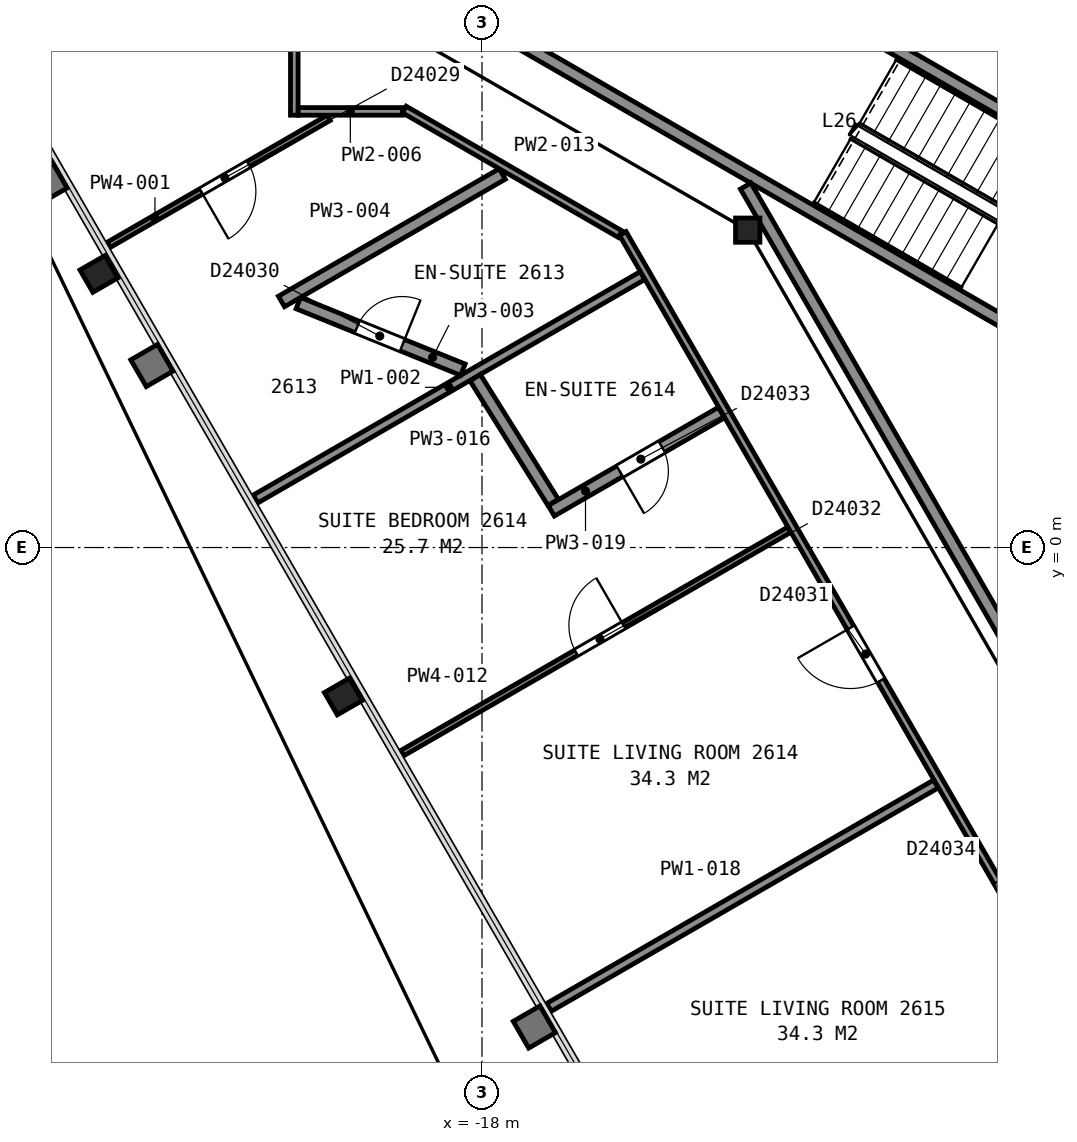
"""IFC4 building model, lengths in metres.
Left out: names, types, materials, properties, quantities, classifications, styles, units other than length and angle.
Written with IfcOpenShell. Run it as: python <this file> out.ifc"""

import sys

from ifc_helpers import new_model, si_unit, direction, frame, frame_2d, origin, origin_2d, place, context, subcontext, project, spatial, rectangle, i_section, extrude, element, fill, save


model = new_model("IFC4")
c1 = context("Model", 3, precision=1e-05, world=origin(), true_north=direction((0.0, 1.0)))
c2 = subcontext(c1, "Body", "Model", "MODEL_VIEW")
j1 = project(units=[si_unit("LENGTHUNIT", "METRE"), si_unit("PLANEANGLEUNIT", "RADIAN")], contexts=[c1])
p1 = place(None, origin())
s1 = spatial("IfcSite", under=j1, at=p1, CompositionType="ELEMENT")
p2 = place(p1, origin())
s2 = spatial("IfcBuilding", under=s1, at=p2, CompositionType="ELEMENT")
p3 = place(p2, frame((0.0, 0.0, 110.8)))
s3 = spatial("IfcBuildingStorey", under=s2, at=p3, CompositionType="ELEMENT", Elevation=110.8)
for number, where, z_axis, x_axis in (
    (1, (-24.3, 4.5, 0.0), (0.0, 0.0, 1.0), (-0.5, 0.866, 0.0)),
    (2, (-20.28, -2.45, 0.0), (0.0, 0.0, 1.0), (-0.5, 0.866, 0.0)),
):
    element("IfcColumn", number, at=place(p3, frame(where, z_axis=z_axis, x_axis=x_axis)), inside=s3, PredefinedType="COLUMN", context=c2, shape_type="SweptSolid", body=[
        extrude(i_section(OverallWidth=0.424, OverallDepth=0.475, WebThickness=0.048, FlangeThickness=0.077, FilletRadius=0.015, at=origin_2d()), origin(), (0.0, 0.0, 1.0), 3.6),
    ])
p4 = place(p3, frame((-13.63, 5.22, 0.0), z_axis=(0.0, 0.0, 1.0), x_axis=(1.0, 0.0, 0.0)))
e3 = element("IfcColumn", 3, at=p4, inside=s3, PredefinedType="COLUMN", context=c2, shape_type="SweptSolid", body=[
    extrude(i_section(OverallWidth=0.401, OverallDepth=0.399, WebThickness=0.025, FlangeThickness=0.04, FilletRadius=0.015, at=origin_2d()), origin(), (0.0, 0.0, 1.0), 3.6),
])
for number, where, z_axis, x_axis in (
    (4, (-7.678, 2.701, 0.0), (0.0, 0.0, 1.0), (-0.866, 0.5, 0.0)),
    (5, (-6.178, 5.299, 0.0), (0.0, 0.0, 1.0), (-0.866, 0.5, 0.0)),
):
    element("IfcWall", number, at=place(p3, frame(where, z_axis=z_axis, x_axis=x_axis)), inside=s3, PredefinedType="PARTITIONING", context=c2, shape_type="SweptSolid", body=[
        extrude(rectangle(XDim=12.0, YDim=0.2, at=frame_2d((6.0, 0.0))), origin(), (0.0, 0.0, 1.0), 3.35),
    ])
p5 = place(p3, frame((-13.664, 5.946, 0.0), z_axis=(0.0, 0.0, 1.0), x_axis=(0.499994327219, -0.866028678941, 0.0)))
e6 = element("IfcWall", 6, at=p5, inside=s3, PredefinedType="PARTITIONING", context=c2, shape_type="SweptSolid", body=[
    extrude(rectangle(XDim=23.968, YDim=0.2, at=frame_2d((11.984, 0.0))), origin(), (0.0, 0.0, 1.0), 3.35),
])
p6 = place(p3, frame((-20.521, 7.067, 0.0), z_axis=(0.0, 0.0, 1.0), x_axis=(-0.866025950195, -0.499999053588, 0.0)))
e7 = element("IfcWall", 7, at=p6, inside=s3, PredefinedType="PARTITIONING", context=c2, shape_type="SweptSolid", body=[
    extrude(rectangle(XDim=4.177, YDim=0.1, at=frame_2d((2.088, 0.0))), origin(), (0.0, 0.0, 1.0), 2.613),
])
p7 = place(p6, frame((1.522, 0.0, 0.0)))
e8 = element("IfcOpeningElement", 8, at=p7, cuts=e7, PredefinedType="OPENING", context=c2, shape_type="SweptSolid", body=[
    extrude(rectangle(XDim=0.9, YDim=2.1, at=frame_2d((0.45, 1.05))), frame((0.0, 0.06, 0.0), z_axis=(0.0, -1.0, 0.0), x_axis=(1.0, 0.0, 0.0)), (0.0, 0.0, 1.0), 0.12),
])
p8 = place(p3, frame((-21.725, 0.798, 0.0), z_axis=(0.0, 0.0, 1.0), x_axis=(0.866003534372, 0.50003787702, 0.0)))
e9 = element("IfcWall", 9, at=p8, inside=s3, PredefinedType="PARTITIONING", context=c2, shape_type="SweptSolid", body=[
    extrude(rectangle(XDim=7.348, YDim=0.15, at=frame_2d((3.674, 0.0))), origin(), (0.0, 0.0, 1.0), 2.613),
])
p9 = place(p3, frame((-21.021, 4.02, 0.0), z_axis=(0.0, 0.0, 1.0), x_axis=(0.927010502524, -0.375035369278, 0.0)))
e10 = element("IfcWall", 10, at=p9, inside=s3, PredefinedType="PARTITIONING", context=c2, shape_type="SweptSolid", body=[
    extrude(rectangle(XDim=2.92, YDim=0.2, at=frame_2d((1.46, 0.0))), origin(), (0.0, 0.0, 1.0), 2.613),
])
p10 = place(p9, frame((1.045, 0.0, 0.0)))
e11 = element("IfcOpeningElement", 11, at=p10, cuts=e10, PredefinedType="OPENING", context=c2, shape_type="SweptSolid", body=[
    extrude(rectangle(XDim=0.8, YDim=2.1, at=frame_2d((0.4, 1.05))), frame((0.0, 0.11, 0.0), z_axis=(0.0, -1.0, 0.0), x_axis=(1.0, 0.0, 0.0)), (0.0, 0.0, 1.0), 0.22),
])
p11 = place(p3, frame((-21.298, 4.047, 0.0), z_axis=(0.0, 0.0, 1.0), x_axis=(0.865948008923, 0.500134027879, 0.0)))
e12 = element("IfcWall", 12, at=p11, inside=s3, PredefinedType="PARTITIONING", context=c2, shape_type="SweptSolid", body=[
    extrude(rectangle(XDim=4.193, YDim=0.2, at=frame_2d((2.097, 0.0))), origin(), (0.0, 0.0, 1.0), 2.613),
])
p12 = place(p3, frame((-21.087, 7.111, 0.0), z_axis=(0.0, 0.0, 1.0), x_axis=(0.0, 1.0, 0.0)))
e13 = element("IfcWall", 13, at=p12, inside=s3, PredefinedType="PARTITIONING", context=c2, shape_type="SweptSolid", body=[
    extrude(rectangle(XDim=3.099, YDim=0.125, at=frame_2d((1.549, 0.0))), origin(), (0.0, 0.0, 1.0), 2.613),
])
p13 = place(p3, frame((-21.022, 7.173, 0.0), z_axis=(0.0, 0.0, 1.0), x_axis=(1.0, 0.0, 0.0)))
e14 = element("IfcWall", 14, at=p13, inside=s3, PredefinedType="PARTITIONING", context=c2, shape_type="SweptSolid", body=[
    extrude(rectangle(XDim=1.713, YDim=0.125, at=frame_2d((0.856, 0.0))), origin(), (0.0, 0.0, 1.0), 2.613),
])
p14 = place(p3, frame((-19.311, -3.382, 0.0), z_axis=(0.0, 0.0, 1.0), x_axis=(0.865995225926, 0.500052265941, 0.0)))
e15 = element("IfcWall", 15, at=p14, inside=s3, PredefinedType="PARTITIONING", context=c2, shape_type="SweptSolid", body=[
    extrude(rectangle(XDim=7.347, YDim=0.1, at=frame_2d((3.674, 0.0))), origin(), (0.0, 0.0, 1.0), 2.613),
])
p15 = place(p14, frame((3.303, 0.0, 0.0)))
e16 = element("IfcOpeningElement", 16, at=p15, cuts=e15, PredefinedType="OPENING", context=c2, shape_type="SweptSolid", body=[
    extrude(rectangle(XDim=0.9, YDim=2.1, at=frame_2d((0.45, 1.05))), frame((0.0, 0.06, 0.0), z_axis=(0.0, -1.0, 0.0), x_axis=(1.0, 0.0, 0.0)), (0.0, 0.0, 1.0), 0.12),
])
p16 = place(p3, frame((-19.278, 7.204, 0.0), z_axis=(0.0, 0.0, 1.0), x_axis=(0.865992261418, -0.50005739987, 0.0)))
e17 = element("IfcWall", 17, at=p16, inside=s3, PredefinedType="PARTITIONING", context=c2, shape_type="SweptSolid", body=[
    extrude(rectangle(XDim=4.101, YDim=0.125, at=frame_2d((2.051, 0.0))), origin(), (0.0, 0.0, 1.0), 2.613),
])
p17 = place(p3, frame((-18.112, 2.793, 0.0), z_axis=(0.0, 0.0, 1.0), x_axis=(0.530334606404, -0.847788420097, 0.0)))
e18 = element("IfcWall", 18, at=p17, inside=s3, PredefinedType="PARTITIONING", context=c2, shape_type="SweptSolid", body=[
    extrude(rectangle(XDim=2.419, YDim=0.2, at=frame_2d((1.209, 0.0))), origin(), (0.0, 0.0, 1.0), 2.613),
])
p18 = place(p3, frame((-16.898, -7.562, 0.0), z_axis=(0.0, 0.0, 1.0), x_axis=(0.866055004685, 0.499948726231, 0.0)))
e19 = element("IfcWall", 19, at=p18, inside=s3, PredefinedType="PARTITIONING", context=c2, shape_type="SweptSolid", body=[
    extrude(rectangle(XDim=7.347, YDim=0.15, at=frame_2d((3.674, 0.0))), origin(), (0.0, 0.0, 1.0), 2.613),
])
p19 = place(p3, frame((-16.861, 0.604, 0.0), z_axis=(0.0, 0.0, 1.0), x_axis=(0.866003189247, 0.500038474733, 0.0)))
e20 = element("IfcWall", 20, at=p19, inside=s3, PredefinedType="PARTITIONING", context=c2, shape_type="SweptSolid", body=[
    extrude(rectangle(XDim=3.232, YDim=0.2, at=frame_2d((1.616, 0.0))), origin(), (0.0, 0.0, 1.0), 2.613),
])
p20 = place(p19, frame((1.3, 0.0, 0.0)))
e21 = element("IfcOpeningElement", 21, at=p20, cuts=e20, PredefinedType="OPENING", context=c2, shape_type="SweptSolid", body=[
    extrude(rectangle(XDim=0.8, YDim=2.1, at=frame_2d((0.4, 1.05))), frame((0.0, 0.11, 0.0), z_axis=(0.0, -1.0, 0.0), x_axis=(1.0, 0.0, 0.0)), (0.0, 0.0, 1.0), 0.22),
])
p21 = place(p3, frame((-3.756, -15.494, 0.0), z_axis=(0.0, 0.0, 1.0), x_axis=(-0.500027787016, 0.866009360349, 0.0)))
e22 = element("IfcWall", 22, at=p21, inside=s3, PredefinedType="PARTITIONING", context=c2, shape_type="SweptSolid", body=[
    extrude(rectangle(XDim=23.856, YDim=0.125, at=frame_2d((11.928, 0.0))), origin(), (0.0, 0.0, 1.0), 2.613),
])
p22 = place(p21, frame((15.368, 0.0, 0.0)))
e23 = element("IfcOpeningElement", 23, at=p22, cuts=e22, PredefinedType="OPENING", context=c2, shape_type="SweptSolid", body=[
    extrude(rectangle(XDim=1.0, YDim=2.1, at=frame_2d((0.5, 1.05))), frame((0.0, 0.073, 0.0), z_axis=(0.0, -1.0, 0.0), x_axis=(1.0, 0.0, 0.0)), (0.0, 0.0, 1.0), 0.145),
])
p23 = place(p21, frame((10.54, 0.0, 0.0)))
e24 = element("IfcOpeningElement", 24, at=p23, cuts=e22, PredefinedType="OPENING", context=c2, shape_type="SweptSolid", body=[
    extrude(rectangle(XDim=1.0, YDim=2.1, at=frame_2d((0.5, 1.05))), frame((0.0, 0.073, 0.0), z_axis=(0.0, -1.0, 0.0), x_axis=(1.0, 0.0, 0.0)), (0.0, 0.0, 1.0), 0.145),
])
p24 = place(p3, frame((-8.117, -8.066, 0.0), z_axis=(0.0, 0.0, 1.0), x_axis=(-0.866052324842, -0.499953368461, 0.0)))
e25 = element("IfcWall", 25, at=p24, inside=s3, PredefinedType="PARTITIONING", context=c2, shape_type="SweptSolid", body=[
    extrude(rectangle(XDim=7.352, YDim=0.1, at=frame_2d((3.676, 0.0))), origin(), (0.0, 0.0, 1.0), 2.613),
])
p25 = place(p24, frame((3.148, 0.0, 0.0)))
e26 = element("IfcOpeningElement", 26, at=p25, cuts=e25, PredefinedType="OPENING", context=c2, shape_type="SweptSolid", body=[
    extrude(rectangle(XDim=0.9, YDim=2.1, at=frame_2d((0.45, 1.05))), frame((0.0, 0.06, 0.0), z_axis=(0.0, -1.0, 0.0), x_axis=(1.0, 0.0, 0.0)), (0.0, 0.0, 1.0), 0.12),
])
p26 = place(p7, origin())
e27 = element("IfcDoor", 27, at=p26, inside=s3, OperationType="SINGLE_SWING_RIGHT", PredefinedType="DOOR", context=c2, shape_type="SweptSolid", body=[
    extrude(rectangle(XDim=0.9, YDim=2.1, at=frame_2d((0.45, 1.05))), frame((0.0, 0.025, 0.0), z_axis=(0.0, -1.0, 0.0), x_axis=(1.0, 0.0, 0.0)), (0.0, 0.0, 1.0), 0.05),
])
fill(e8, e27)
p27 = place(p10, origin())
e28 = element("IfcDoor", 28, at=p27, inside=s3, OperationType="SINGLE_SWING_RIGHT", PredefinedType="DOOR", context=c2, shape_type="SweptSolid", body=[
    extrude(rectangle(XDim=0.8, YDim=2.1, at=frame_2d((0.4, 1.05))), frame((0.0, 0.025, 0.0), z_axis=(0.0, -1.0, 0.0), x_axis=(1.0, 0.0, 0.0)), (0.0, 0.0, 1.0), 0.05),
])
fill(e11, e28)
p28 = place(p15, origin())
e29 = element("IfcDoor", 29, at=p28, inside=s3, OperationType="SINGLE_SWING_RIGHT", PredefinedType="DOOR", context=c2, shape_type="SweptSolid", body=[
    extrude(rectangle(XDim=0.9, YDim=2.1, at=frame_2d((0.45, 1.05))), frame((0.0, 0.025, 0.0), z_axis=(0.0, -1.0, 0.0), x_axis=(1.0, 0.0, 0.0)), (0.0, 0.0, 1.0), 0.05),
])
fill(e16, e29)
p29 = place(p20, origin())
e30 = element("IfcDoor", 30, at=p29, inside=s3, OperationType="SINGLE_SWING_LEFT", PredefinedType="DOOR", context=c2, shape_type="SweptSolid", body=[
    extrude(rectangle(XDim=0.8, YDim=2.1, at=frame_2d((0.4, 1.05))), frame((0.0, 0.025, 0.0), z_axis=(0.0, -1.0, 0.0), x_axis=(1.0, 0.0, 0.0)), (0.0, 0.0, 1.0), 0.05),
])
fill(e21, e30)
p30 = place(p22, origin())
e31 = element("IfcDoor", 31, at=p30, inside=s3, OperationType="SINGLE_SWING_RIGHT", PredefinedType="DOOR", context=c2, shape_type="SweptSolid", body=[
    extrude(rectangle(XDim=1.0, YDim=2.1, at=frame_2d((0.5, 1.05))), frame((0.0, 0.025, 0.0), z_axis=(0.0, -1.0, 0.0), x_axis=(1.0, 0.0, 0.0)), (0.0, 0.0, 1.0), 0.05),
])
fill(e23, e31)
p31 = place(p23, origin())
e32 = element("IfcDoor", 32, at=p31, inside=s3, OperationType="SINGLE_SWING_LEFT", PredefinedType="DOOR", context=c2, shape_type="SweptSolid", body=[
    extrude(rectangle(XDim=1.0, YDim=2.1, at=frame_2d((0.5, 1.05))), frame((0.0, 0.025, 0.0), z_axis=(0.0, -1.0, 0.0), x_axis=(1.0, 0.0, 0.0)), (0.0, 0.0, 1.0), 0.05),
])
fill(e24, e32)
save(model, sys.argv[1])
